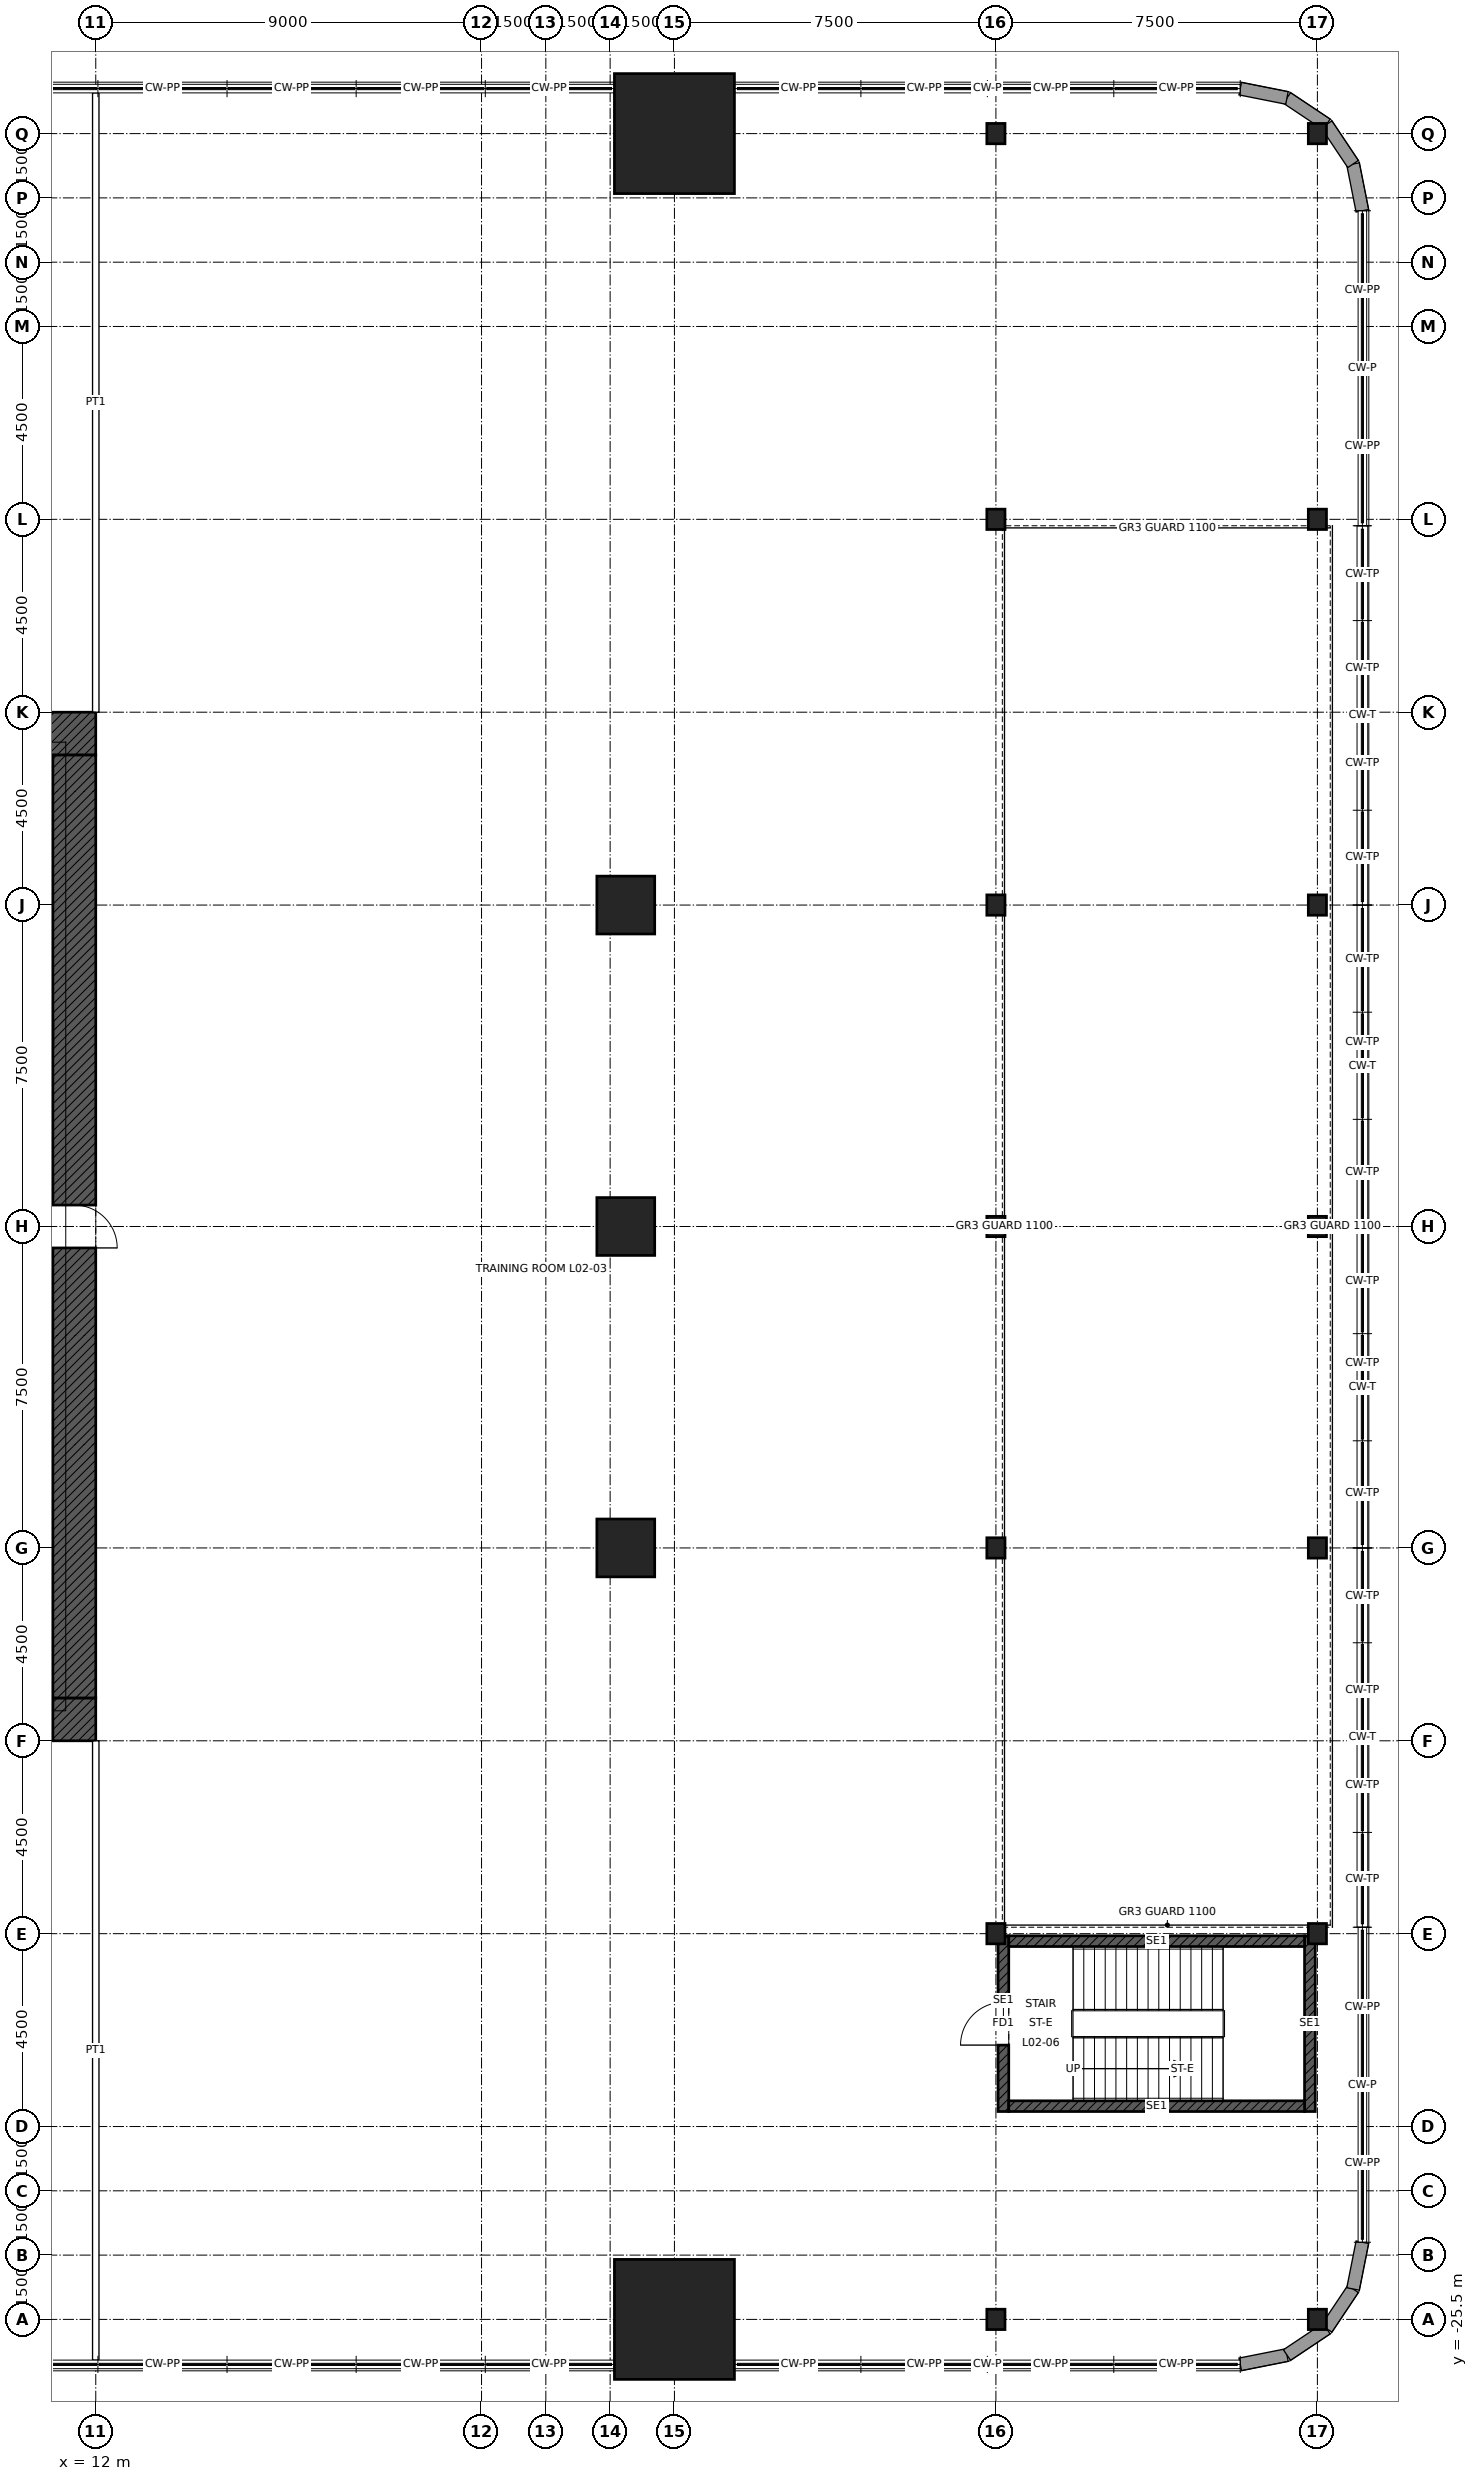
"""IFC4 building model, lengths in metres.
Left out: names, types, materials, properties, quantities, classifications, styles, units other than length and angle.
Written with IfcOpenShell. Run it as: python <this file> out.ifc"""

import sys

from ifc_helpers import new_model, si_unit, direction, frame, frame_2d, origin, origin_2d, place, context, subcontext, project, spatial, rectangle, hollow_rectangle, i_section, extrude, element, fill, save


model = new_model("IFC4")
c1 = context("Model", 3, precision=1e-05, world=origin(), true_north=direction((0.0, 1.0)))
c2 = subcontext(c1, "Body", "Model", "MODEL_VIEW")
j1 = project(units=[si_unit("LENGTHUNIT", "METRE"), si_unit("PLANEANGLEUNIT", "RADIAN")], contexts=[c1])
p1 = place(None, origin())
s1 = spatial("IfcSite", under=j1, at=p1, CompositionType="ELEMENT")
p2 = place(p1, origin())
s2 = spatial("IfcBuilding", under=s1, at=p2, CompositionType="ELEMENT")
p3 = place(p2, frame((0.0, 0.0, 12.6)))
s3 = spatial("IfcBuildingStorey", under=s2, at=p3, CompositionType="ELEMENT", Elevation=12.6)
for number, where, z_axis, x_axis in (
    (1, (25.5, 25.5, 0.0), (0.0, 0.0, 1.0), (1.0, 0.0, 0.0)),
    (2, (25.5, -25.5, 0.0), (0.0, 0.0, 1.0), (1.0, 0.0, 0.0)),
):
    element("IfcColumn", number, at=place(p3, frame(where, z_axis=z_axis, x_axis=x_axis)), inside=s3, PredefinedType="COLUMN", context=c2, shape_type="SweptSolid", body=[
        extrude(hollow_rectangle(XDim=2.8, YDim=2.8, WallThickness=0.14, at=origin_2d()), origin(), (0.0, 0.0, 1.0), 5.4),
    ])
for number, where, z_axis, x_axis in (
    (3, (24.365, 7.5, 0.0), (0.0, 0.0, 1.0), (1.0, 0.0, 0.0)),
    (4, (24.365, 0.0, 0.0), (0.0, 0.0, 1.0), (1.0, 0.0, 0.0)),
    (5, (24.365, -7.5, 0.0), (0.0, 0.0, 1.0), (1.0, 0.0, 0.0)),
):
    element("IfcColumn", number, at=place(p3, frame(where, z_axis=z_axis, x_axis=x_axis)), inside=s3, PredefinedType="COLUMN", context=c2, shape_type="SweptSolid", body=[
        extrude(hollow_rectangle(XDim=1.35, YDim=1.35, WallThickness=0.1, at=origin_2d()), origin(), (0.0, 0.0, 1.0), 5.4),
    ])
for number, where, z_axis, x_axis in (
    (6, (33.0, -25.5, 0.0), (0.0, 0.0, 1.0), (1.0, 0.0, 0.0)),
    (7, (33.0, -16.5, 0.0), (0.0, 0.0, 1.0), (1.0, 0.0, 0.0)),
    (8, (33.0, -7.5, 0.0), (0.0, 0.0, 1.0), (1.0, 0.0, 0.0)),
    (9, (33.0, 0.0, 0.0), (0.0, 0.0, 1.0), (1.0, 0.0, 0.0)),
    (10, (33.0, 7.5, 0.0), (0.0, 0.0, 1.0), (1.0, 0.0, 0.0)),
    (11, (33.0, 16.5, 0.0), (0.0, 0.0, 1.0), (1.0, 0.0, 0.0)),
    (12, (33.0, 25.5, 0.0), (0.0, 0.0, 1.0), (1.0, 0.0, 0.0)),
    (13, (40.5, -25.5, 0.0), (0.0, 0.0, 1.0), (1.0, 0.0, 0.0)),
    (14, (40.5, -16.5, 0.0), (0.0, 0.0, 1.0), (1.0, 0.0, 0.0)),
    (15, (40.5, -7.5, 0.0), (0.0, 0.0, 1.0), (1.0, 0.0, 0.0)),
    (16, (40.5, 0.0, 0.0), (0.0, 0.0, 1.0), (1.0, 0.0, 0.0)),
    (17, (40.5, 7.5, 0.0), (0.0, 0.0, 1.0), (1.0, 0.0, 0.0)),
    (18, (40.5, 16.5, 0.0), (0.0, 0.0, 1.0), (1.0, 0.0, 0.0)),
    (19, (40.5, 25.5, 0.0), (0.0, 0.0, 1.0), (1.0, 0.0, 0.0)),
):
    element("IfcColumn", number, at=place(p3, frame(where, z_axis=z_axis, x_axis=x_axis)), inside=s3, PredefinedType="COLUMN", context=c2, shape_type="SweptSolid", body=[
        extrude(i_section(OverallWidth=0.424, OverallDepth=0.475, WebThickness=0.048, FlangeThickness=0.077, at=origin_2d()), origin(), (0.0, 0.0, 1.0), 5.4),
    ])
p4 = place(p3, frame((-12.0, 11.5, 0.0), z_axis=(0.0, 0.0, 1.0), x_axis=(1.0, 0.0, 0.0)))
e20 = element("IfcWall", 20, at=p4, inside=s3, PredefinedType="SHEAR", context=c2, shape_type="SweptSolid", body=[
    extrude(rectangle(XDim=24.0, YDim=1.0, at=frame_2d((12.0, 0.0))), origin(), (0.0, 0.0, 1.0), 5.4),
])
p5 = place(p4, frame((6.25, 0.0, 0.0)))
e21 = element("IfcOpeningElement", 21, at=p5, cuts=e20, PredefinedType="OPENING", context=c2, shape_type="SweptSolid", body=[
    extrude(rectangle(XDim=1.0, YDim=2.4, at=frame_2d((0.5, 1.2))), frame((0.0, 0.51, 0.0), z_axis=(0.0, -1.0, 0.0), x_axis=(1.0, 0.0, 0.0)), (0.0, 0.0, 1.0), 1.02),
])
p6 = place(p4, frame((16.75, 0.0, 0.0)))
e22 = element("IfcOpeningElement", 22, at=p6, cuts=e20, PredefinedType="OPENING", context=c2, shape_type="SweptSolid", body=[
    extrude(rectangle(XDim=1.0, YDim=2.4, at=frame_2d((0.5, 1.2))), frame((0.0, 0.51, 0.0), z_axis=(0.0, -1.0, 0.0), x_axis=(1.0, 0.0, 0.0)), (0.0, 0.0, 1.0), 1.02),
])
p7 = place(p3, frame((12.0, -11.5, 0.0), z_axis=(0.0, 0.0, 1.0), x_axis=(-1.0, 0.0, 0.0)))
e23 = element("IfcWall", 23, at=p7, inside=s3, PredefinedType="SHEAR", context=c2, shape_type="SweptSolid", body=[
    extrude(rectangle(XDim=24.0, YDim=1.0, at=frame_2d((12.0, 0.0))), origin(), (0.0, 0.0, 1.0), 5.4),
])
p8 = place(p7, frame((11.5, 0.0, 0.0)))
e24 = element("IfcOpeningElement", 24, at=p8, cuts=e23, PredefinedType="OPENING", context=c2, shape_type="SweptSolid", body=[
    extrude(rectangle(XDim=1.0, YDim=2.1, at=frame_2d((0.5, 1.05))), frame((0.0, 0.51, 0.0), z_axis=(0.0, -1.0, 0.0), x_axis=(1.0, 0.0, 0.0)), (0.0, 0.0, 1.0), 1.02),
])
p9 = place(p7, frame((1.0, 0.0, 0.0)))
e25 = element("IfcOpeningElement", 25, at=p9, cuts=e23, PredefinedType="OPENING", context=c2, shape_type="SweptSolid", body=[
    extrude(rectangle(XDim=1.0, YDim=2.4, at=frame_2d((0.5, 1.2))), frame((0.0, 0.51, 0.0), z_axis=(0.0, -1.0, 0.0), x_axis=(1.0, 0.0, 0.0)), (0.0, 0.0, 1.0), 1.02),
])
p10 = place(p3, frame((11.5, 11.0, 0.0), z_axis=(0.0, 0.0, 1.0), x_axis=(0.0, -1.0, 0.0)))
e26 = element("IfcWall", 26, at=p10, inside=s3, PredefinedType="SHEAR", context=c2, shape_type="SweptSolid", body=[
    extrude(rectangle(XDim=22.0, YDim=1.0, at=frame_2d((11.0, 0.0))), origin(), (0.0, 0.0, 1.0), 5.4),
])
p11 = place(p10, frame((10.5, 0.0, 0.0)))
e27 = element("IfcOpeningElement", 27, at=p11, cuts=e26, PredefinedType="OPENING", context=c2, shape_type="SweptSolid", body=[
    extrude(rectangle(XDim=1.0, YDim=2.4, at=frame_2d((0.5, 1.2))), frame((0.0, 0.51, 0.0), z_axis=(0.0, -1.0, 0.0), x_axis=(1.0, 0.0, 0.0)), (0.0, 0.0, 1.0), 1.02),
])
for number, where, z_axis, x_axis in (
    (28, (41.55, 23.7, 0.0), (0.0, 0.0, 1.0), (-0.195, 0.981, 0.0)),
    (29, (41.333, 24.791, 0.0), (0.0, 0.0, 1.0), (-0.555, 0.832, 0.0)),
    (30, (40.715, 25.715, 0.0), (0.0, 0.0, 1.0), (-0.832, 0.555, 0.0)),
    (31, (39.791, 26.333, 0.0), (0.0, 0.0, 1.0), (-0.981, 0.195, 0.0)),
    (32, (38.7, -26.55, 0.0), (0.0, 0.0, 1.0), (0.981, 0.195, 0.0)),
    (33, (39.791, -26.333, 0.0), (0.0, 0.0, 1.0), (0.832, 0.555, 0.0)),
    (34, (40.715, -25.715, 0.0), (0.0, 0.0, 1.0), (0.555, 0.832, 0.0)),
    (35, (41.333, -24.791, 0.0), (0.0, 0.0, 1.0), (0.195, 0.981, 0.0)),
):
    element("IfcWall", number, at=place(p3, frame(where, z_axis=z_axis, x_axis=x_axis)), inside=s3, PredefinedType="SOLIDWALL", context=c2, shape_type="SweptSolid", body=[
        extrude(rectangle(XDim=1.112, YDim=0.3, at=frame_2d((0.556, 0.0))), origin(), (0.0, 0.0, 1.0), 5.15),
    ])
p12 = place(p3, frame((12.0, 12.0, 0.0), z_axis=(0.0, 0.0, 1.0), x_axis=(0.0, 1.0, 0.0)))
e36 = element("IfcWall", 36, at=p12, inside=s3, PredefinedType="PARTITIONING", context=c2, shape_type="SweptSolid", body=[
    extrude(rectangle(XDim=14.45, YDim=0.15, at=frame_2d((7.225, 0.0))), origin(), (0.0, 0.0, 1.0), 5.15),
])
p13 = place(p3, frame((12.0, -12.0, 0.0), z_axis=(0.0, 0.0, 1.0), x_axis=(0.0, -1.0, 0.0)))
e37 = element("IfcWall", 37, at=p13, inside=s3, PredefinedType="PARTITIONING", context=c2, shape_type="SweptSolid", body=[
    extrude(rectangle(XDim=14.45, YDim=0.15, at=frame_2d((7.225, 0.0))), origin(), (0.0, 0.0, 1.0), 4.108),
])
p14 = place(p3, frame((33.175, -20.65, 0.0), z_axis=(0.0, 0.0, 1.0), x_axis=(0.0, 1.0, 0.0)))
e38 = element("IfcWall", 38, at=p14, inside=s3, PredefinedType="SOLIDWALL", context=c2, shape_type="SweptSolid", body=[
    extrude(rectangle(XDim=4.1, YDim=0.25, at=frame_2d((2.05, 0.0))), origin(), (0.0, 0.0, 1.0), 5.15),
])
p15 = place(p14, frame((1.55, 0.0, 0.0)))
e39 = element("IfcOpeningElement", 39, at=p15, cuts=e38, PredefinedType="OPENING", context=c2, shape_type="SweptSolid", body=[
    extrude(rectangle(XDim=1.0, YDim=2.1, at=frame_2d((0.5, 1.05))), frame((0.0, 0.135, 0.0), z_axis=(0.0, -1.0, 0.0), x_axis=(1.0, 0.0, 0.0)), (0.0, 0.0, 1.0), 0.27),
])
p16 = place(p3, frame((40.325, -20.65, 0.0), z_axis=(0.0, 0.0, 1.0), x_axis=(0.0, 1.0, 0.0)))
e40 = element("IfcWall", 40, at=p16, inside=s3, PredefinedType="SOLIDWALL", context=c2, shape_type="SweptSolid", body=[
    extrude(rectangle(XDim=4.1, YDim=0.25, at=frame_2d((2.05, 0.0))), origin(), (0.0, 0.0, 1.0), 5.15),
])
for number, where, z_axis, x_axis in (
    (41, (33.3, -20.525, 0.0), (0.0, 0.0, 1.0), (1.0, 0.0, 0.0)),
    (42, (33.3, -16.675, 0.0), (0.0, 0.0, 1.0), (1.0, 0.0, 0.0)),
):
    element("IfcWall", number, at=place(p3, frame(where, z_axis=z_axis, x_axis=x_axis)), inside=s3, PredefinedType="SOLIDWALL", context=c2, shape_type="SweptSolid", body=[
        extrude(rectangle(XDim=6.9, YDim=0.25, at=frame_2d((3.45, 0.0))), origin(), (0.0, 0.0, 1.0), 5.15),
    ])
p17 = place(p11, origin())
e43 = element("IfcDoor", 43, at=p17, inside=s3, OperationType="SINGLE_SWING_RIGHT", PredefinedType="DOOR", context=c2, shape_type="SweptSolid", body=[
    extrude(rectangle(XDim=1.0, YDim=2.4, at=frame_2d((0.5, 1.2))), frame((0.0, 0.485, 0.0), z_axis=(0.0, -1.0, 0.0), x_axis=(1.0, 0.0, 0.0)), (0.0, 0.0, 1.0), 0.05),
])
fill(e27, e43)
p18 = place(p15, origin())
e44 = element("IfcDoor", 44, at=p18, inside=s3, OperationType="SINGLE_SWING_LEFT", PredefinedType="DOOR", context=c2, shape_type="SweptSolid", body=[
    extrude(rectangle(XDim=1.0, YDim=2.1, at=frame_2d((0.5, 1.05))), frame((0.0, 0.025, 0.0), z_axis=(0.0, -1.0, 0.0), x_axis=(1.0, 0.0, 0.0)), (0.0, 0.0, 1.0), 0.05),
])
fill(e39, e44)
save(model, sys.argv[1])
